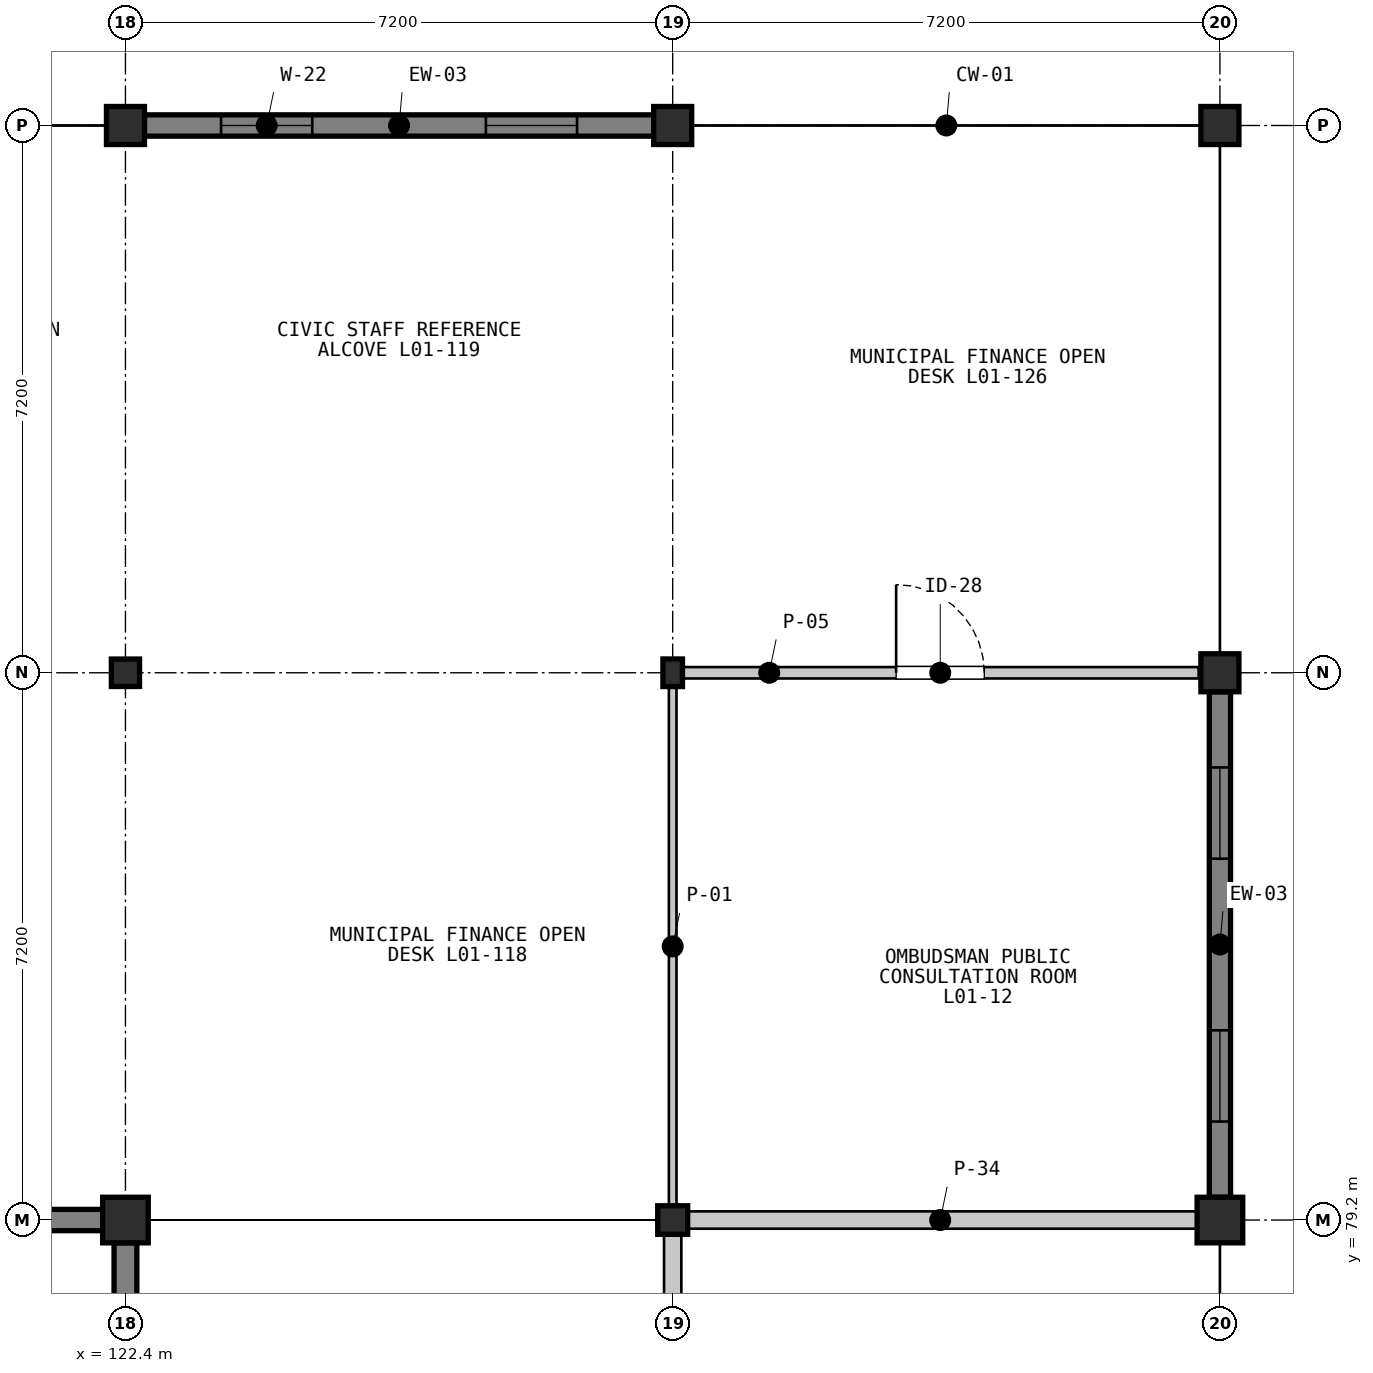
"""IFC4 building model, lengths in metres.
Left out: names, types, materials, properties, quantities, classifications, styles, units other than length and angle.
Written with IfcOpenShell. Run it as: python <this file> out.ifc"""

import sys

from ifc_helpers import new_model, si_unit, direction, frame, frame_2d, origin, origin_2d, place, context, subcontext, project, spatial, rectangle, i_section, extrude, element, fill, save


model = new_model("IFC4")
c1 = context("Model", 3, precision=1e-05, world=origin(), true_north=direction((0.0, 1.0)))
c2 = subcontext(c1, "Body", "Model", "MODEL_VIEW")
j1 = project(units=[si_unit("LENGTHUNIT", "METRE"), si_unit("PLANEANGLEUNIT", "RADIAN")], contexts=[c1])
p1 = place(None, origin())
s1 = spatial("IfcSite", under=j1, at=p1, CompositionType="ELEMENT")
p2 = place(p1, origin())
s2 = spatial("IfcBuilding", under=s1, at=p2, CompositionType="ELEMENT")
p3 = place(p2, origin())
s3 = spatial("IfcBuildingStorey", under=s2, at=p3, CompositionType="ELEMENT", Elevation=0.0)
p4 = place(p3, frame((122.4, 79.2, 0.0), z_axis=(0.0, 0.0, 1.0), x_axis=(1.0, 0.0, 0.0)))
e1 = element("IfcColumn", 1, at=p4, inside=s3, PredefinedType="COLUMN", context=c2, shape_type="SweptSolid", body=[
    extrude(rectangle(XDim=0.6, YDim=0.6, at=origin_2d()), origin(), (0.0, 0.0, 1.0), 5.4),
])
p5 = place(p3, frame((122.4, 86.4, 0.0), z_axis=(0.0, 0.0, 1.0), x_axis=(1.0, 0.0, 0.0)))
e2 = element("IfcColumn", 2, at=p5, inside=s3, PredefinedType="COLUMN", context=c2, shape_type="SweptSolid", body=[
    extrude(i_section(OverallWidth=0.371, OverallDepth=0.361, WebThickness=0.012, FlangeThickness=0.02, FilletRadius=0.015, at=origin_2d()), origin(), (0.0, 0.0, 1.0), 5.4),
])
p6 = place(p3, frame((122.4, 93.6, 0.0), z_axis=(0.0, 0.0, 1.0), x_axis=(1.0, 0.0, 0.0)))
e3 = element("IfcColumn", 3, at=p6, inside=s3, PredefinedType="COLUMN", context=c2, shape_type="SweptSolid", body=[
    extrude(rectangle(XDim=0.5, YDim=0.5, at=origin_2d()), origin(), (0.0, 0.0, 1.0), 5.4),
])
p7 = place(p3, frame((129.6, 79.2, 0.0), z_axis=(0.0, 0.0, 1.0), x_axis=(1.0, 0.0, 0.0)))
e4 = element("IfcColumn", 4, at=p7, inside=s3, PredefinedType="COLUMN", context=c2, shape_type="SweptSolid", body=[
    extrude(i_section(OverallWidth=0.394, OverallDepth=0.376, WebThickness=0.017, FlangeThickness=0.028, FilletRadius=0.015, at=origin_2d()), origin(), (0.0, 0.0, 1.0), 5.4),
])
p8 = place(p3, frame((129.6, 86.4, 0.0), z_axis=(0.0, 0.0, 1.0), x_axis=(1.0, 0.0, 0.0)))
e5 = element("IfcColumn", 5, at=p8, inside=s3, PredefinedType="COLUMN", context=c2, shape_type="SweptSolid", body=[
    extrude(i_section(OverallWidth=0.257, OverallDepth=0.363, WebThickness=0.013, FlangeThickness=0.022, FilletRadius=0.015, at=origin_2d()), origin(), (0.0, 0.0, 1.0), 5.4),
])
p9 = place(p3, frame((129.6, 93.6, 0.0), z_axis=(0.0, 0.0, 1.0), x_axis=(1.0, 0.0, 0.0)))
e6 = element("IfcColumn", 6, at=p9, inside=s3, PredefinedType="COLUMN", context=c2, shape_type="SweptSolid", body=[
    extrude(rectangle(XDim=0.5, YDim=0.5, at=origin_2d()), origin(), (0.0, 0.0, 1.0), 5.4),
])
p10 = place(p3, frame((136.8, 79.2, 0.0), z_axis=(0.0, 0.0, 1.0), x_axis=(1.0, 0.0, 0.0)))
e7 = element("IfcColumn", 7, at=p10, inside=s3, PredefinedType="COLUMN", context=c2, shape_type="SweptSolid", body=[
    extrude(rectangle(XDim=0.6, YDim=0.6, at=origin_2d()), origin(), (0.0, 0.0, 1.0), 5.4),
])
for number, where, z_axis, x_axis in (
    (8, (136.8, 86.4, 0.0), (0.0, 0.0, 1.0), (1.0, 0.0, 0.0)),
    (9, (136.8, 93.6, 0.0), (0.0, 0.0, 1.0), (1.0, 0.0, 0.0)),
):
    element("IfcColumn", number, at=place(p3, frame(where, z_axis=z_axis, x_axis=x_axis)), inside=s3, PredefinedType="COLUMN", context=c2, shape_type="SweptSolid", body=[
        extrude(rectangle(XDim=0.5, YDim=0.5, at=origin_2d()), origin(), (0.0, 0.0, 1.0), 5.4),
    ])
p11 = place(p3, frame((122.1, 79.2, 0.0), z_axis=(0.0, 0.0, 1.0), x_axis=(-1.0, 0.0, 0.0)))
e10 = element("IfcWall", 10, at=p11, inside=s3, PredefinedType="SOLIDWALL", context=c2, shape_type="SweptSolid", body=[
    extrude(rectangle(XDim=6.6, YDim=0.28, at=frame_2d((3.3, 0.0))), origin(), (0.0, 0.0, 1.0), 4.438),
])
p12 = place(p11, frame((0.984, 0.0, 0.95)))
e11 = element("IfcOpeningElement", 11, at=p12, cuts=e10, PredefinedType="OPENING", context=c2, shape_type="SweptSolid", body=[
    extrude(rectangle(XDim=1.2, YDim=1.7, at=frame_2d((0.6, 0.85))), frame((0.0, 0.15, 0.0), z_axis=(0.0, -1.0, 0.0), x_axis=(1.0, 0.0, 0.0)), (0.0, 0.0, 1.0), 0.3),
])
p13 = place(p11, frame((4.416, 0.0, 0.95)))
e12 = element("IfcOpeningElement", 12, at=p13, cuts=e10, PredefinedType="OPENING", context=c2, shape_type="SweptSolid", body=[
    extrude(rectangle(XDim=1.2, YDim=1.7, at=frame_2d((0.6, 0.85))), frame((0.0, 0.15, 0.0), z_axis=(0.0, -1.0, 0.0), x_axis=(1.0, 0.0, 0.0)), (0.0, 0.0, 1.0), 0.3),
])
p14 = place(p3, frame((122.4, 72.3, 0.0), z_axis=(0.0, 0.0, 1.0), x_axis=(0.0, 1.0, 0.0)))
e13 = element("IfcWall", 13, at=p14, inside=s3, PredefinedType="SOLIDWALL", context=c2, shape_type="SweptSolid", body=[
    extrude(rectangle(XDim=6.6, YDim=0.3, at=frame_2d((3.3, 0.0))), origin(), (0.0, 0.0, 1.0), 4.667),
])
p15 = place(p14, frame((0.984, 0.0, 0.95)))
e14 = element("IfcOpeningElement", 14, at=p15, cuts=e13, PredefinedType="OPENING", context=c2, shape_type="SweptSolid", body=[
    extrude(rectangle(XDim=1.2, YDim=1.7, at=frame_2d((0.6, 0.85))), frame((0.0, 0.16, 0.0), z_axis=(0.0, -1.0, 0.0), x_axis=(1.0, 0.0, 0.0)), (0.0, 0.0, 1.0), 0.32),
])
p16 = place(p14, frame((4.416, 0.0, 0.95)))
e15 = element("IfcOpeningElement", 15, at=p16, cuts=e13, PredefinedType="OPENING", context=c2, shape_type="SweptSolid", body=[
    extrude(rectangle(XDim=1.2, YDim=1.7, at=frame_2d((0.6, 0.85))), frame((0.0, 0.16, 0.0), z_axis=(0.0, -1.0, 0.0), x_axis=(1.0, 0.0, 0.0)), (0.0, 0.0, 1.0), 0.32),
])
p17 = place(p3, frame((122.65, 93.6, 0.0), z_axis=(0.0, 0.0, 1.0), x_axis=(1.0, 0.0, 0.0)))
e16 = element("IfcWall", 16, at=p17, inside=s3, PredefinedType="SOLIDWALL", context=c2, shape_type="SweptSolid", body=[
    extrude(rectangle(XDim=6.7, YDim=0.28, at=frame_2d((3.35, 0.0))), origin(), (0.0, 0.0, 1.0), 4.598),
])
p18 = place(p17, frame((1.008, 0.0, 0.95)))
e17 = element("IfcOpeningElement", 17, at=p18, cuts=e16, PredefinedType="OPENING", context=c2, shape_type="SweptSolid", body=[
    extrude(rectangle(XDim=1.2, YDim=1.7, at=frame_2d((0.6, 0.85))), frame((0.0, 0.15, 0.0), z_axis=(0.0, -1.0, 0.0), x_axis=(1.0, 0.0, 0.0)), (0.0, 0.0, 1.0), 0.3),
])
p19 = place(p17, frame((4.492, 0.0, 0.95)))
e18 = element("IfcOpeningElement", 18, at=p19, cuts=e16, PredefinedType="OPENING", context=c2, shape_type="SweptSolid", body=[
    extrude(rectangle(XDim=1.2, YDim=1.7, at=frame_2d((0.6, 0.85))), frame((0.0, 0.15, 0.0), z_axis=(0.0, -1.0, 0.0), x_axis=(1.0, 0.0, 0.0)), (0.0, 0.0, 1.0), 0.3),
])
p20 = place(p3, frame((136.8, 86.15, 0.0), z_axis=(0.0, 0.0, 1.0), x_axis=(0.0, -1.0, 0.0)))
e19 = element("IfcWall", 19, at=p20, inside=s3, PredefinedType="SOLIDWALL", context=c2, shape_type="SweptSolid", body=[
    extrude(rectangle(XDim=6.65, YDim=0.28, at=frame_2d((3.325, 0.0))), origin(), (0.0, 0.0, 1.0), 4.667),
])
p21 = place(p20, frame((0.996, 0.0, 0.95)))
e20 = element("IfcOpeningElement", 20, at=p21, cuts=e19, PredefinedType="OPENING", context=c2, shape_type="SweptSolid", body=[
    extrude(rectangle(XDim=1.2, YDim=1.7, at=frame_2d((0.6, 0.85))), frame((0.0, 0.15, 0.0), z_axis=(0.0, -1.0, 0.0), x_axis=(1.0, 0.0, 0.0)), (0.0, 0.0, 1.0), 0.3),
])
p22 = place(p20, frame((4.454, 0.0, 0.95)))
e21 = element("IfcOpeningElement", 21, at=p22, cuts=e19, PredefinedType="OPENING", context=c2, shape_type="SweptSolid", body=[
    extrude(rectangle(XDim=1.2, YDim=1.7, at=frame_2d((0.6, 0.85))), frame((0.0, 0.15, 0.0), z_axis=(0.0, -1.0, 0.0), x_axis=(1.0, 0.0, 0.0)), (0.0, 0.0, 1.0), 0.3),
])
p23 = place(p3, frame((129.72, 79.2, 0.0), z_axis=(0.0, 0.0, 1.0), x_axis=(1.0, 0.0, 0.0)))
e22 = element("IfcWall", 22, at=p23, inside=s3, PredefinedType="PARTITIONING", context=c2, shape_type="SweptSolid", body=[
    extrude(rectangle(XDim=6.8, YDim=0.228, at=frame_2d((3.4, 0.0))), origin(), (0.0, 0.0, 1.0), 4.428),
])
p24 = place(p3, frame((129.6, 72.12, 0.0), z_axis=(0.0, 0.0, 1.0), x_axis=(0.0, 1.0, 0.0)))
e23 = element("IfcWall", 23, at=p24, inside=s3, PredefinedType="PARTITIONING", context=c2, shape_type="SweptSolid", body=[
    extrude(rectangle(XDim=6.96, YDim=0.228, at=frame_2d((3.48, 0.0))), origin(), (0.0, 0.0, 1.0), 4.428),
])
p25 = place(p3, frame((129.72, 86.4, 0.0), z_axis=(0.0, 0.0, 1.0), x_axis=(1.0, 0.0, 0.0)))
e24 = element("IfcWall", 24, at=p25, inside=s3, PredefinedType="PARTITIONING", context=c2, shape_type="SweptSolid", body=[
    extrude(rectangle(XDim=6.8, YDim=0.15, at=frame_2d((3.4, 0.0))), origin(), (0.0, 0.0, 1.0), 4.428),
])
p26 = place(p25, frame((2.82, 0.0, 0.0)))
e25 = element("IfcOpeningElement", 25, at=p26, cuts=e24, PredefinedType="OPENING", context=c2, shape_type="SweptSolid", body=[
    extrude(rectangle(XDim=1.16, YDim=2.2, at=frame_2d((0.58, 1.1))), frame((0.0, 0.085, 0.0), z_axis=(0.0, -1.0, 0.0), x_axis=(1.0, 0.0, 0.0)), (0.0, 0.0, 1.0), 0.17),
])
p27 = place(p3, frame((129.6, 79.32, 0.0), z_axis=(0.0, 0.0, 1.0), x_axis=(0.0, 1.0, 0.0)))
e26 = element("IfcWall", 26, at=p27, inside=s3, PredefinedType="PARTITIONING", context=c2, shape_type="SweptSolid", body=[
    extrude(rectangle(XDim=6.96, YDim=0.1, at=frame_2d((3.48, 0.0))), origin(), (0.0, 0.0, 1.0), 4.428),
])
p28 = place(p18, origin())
e27 = element("IfcWindow", 27, at=p28, inside=s3, PartitioningType="SINGLE_PANEL", PredefinedType="WINDOW", context=c2, shape_type="SweptSolid", body=[
    extrude(rectangle(XDim=1.2, YDim=1.7, at=frame_2d((0.6, 0.85))), frame((0.0, 0.03, 0.0), z_axis=(0.0, -1.0, 0.0), x_axis=(1.0, 0.0, 0.0)), (0.0, 0.0, 1.0), 0.06),
])
fill(e17, e27)
p29 = place(p19, origin())
e28 = element("IfcWindow", 28, at=p29, inside=s3, PartitioningType="SINGLE_PANEL", PredefinedType="WINDOW", context=c2, shape_type="SweptSolid", body=[
    extrude(rectangle(XDim=1.2, YDim=1.7, at=frame_2d((0.6, 0.85))), frame((0.0, 0.03, 0.0), z_axis=(0.0, -1.0, 0.0), x_axis=(1.0, 0.0, 0.0)), (0.0, 0.0, 1.0), 0.06),
])
fill(e18, e28)
p30 = place(p21, origin())
e29 = element("IfcWindow", 29, at=p30, inside=s3, PartitioningType="SINGLE_PANEL", PredefinedType="WINDOW", context=c2, shape_type="SweptSolid", body=[
    extrude(rectangle(XDim=1.2, YDim=1.7, at=frame_2d((0.6, 0.85))), frame((0.0, 0.03, 0.0), z_axis=(0.0, -1.0, 0.0), x_axis=(1.0, 0.0, 0.0)), (0.0, 0.0, 1.0), 0.06),
])
fill(e20, e29)
p31 = place(p22, origin())
e30 = element("IfcWindow", 30, at=p31, inside=s3, PartitioningType="SINGLE_PANEL", PredefinedType="WINDOW", context=c2, shape_type="SweptSolid", body=[
    extrude(rectangle(XDim=1.2, YDim=1.7, at=frame_2d((0.6, 0.85))), frame((0.0, 0.03, 0.0), z_axis=(0.0, -1.0, 0.0), x_axis=(1.0, 0.0, 0.0)), (0.0, 0.0, 1.0), 0.06),
])
fill(e21, e30)
p32 = place(p26, origin())
e31 = element("IfcDoor", 31, at=p32, inside=s3, OperationType="SINGLE_SWING_LEFT", PredefinedType="DOOR", context=c2, shape_type="SweptSolid", body=[
    extrude(rectangle(XDim=1.16, YDim=2.2, at=frame_2d((0.58, 1.1))), frame((0.0, 0.025, 0.0), z_axis=(0.0, -1.0, 0.0), x_axis=(1.0, 0.0, 0.0)), (0.0, 0.0, 1.0), 0.05),
])
fill(e25, e31)
save(model, sys.argv[1])
